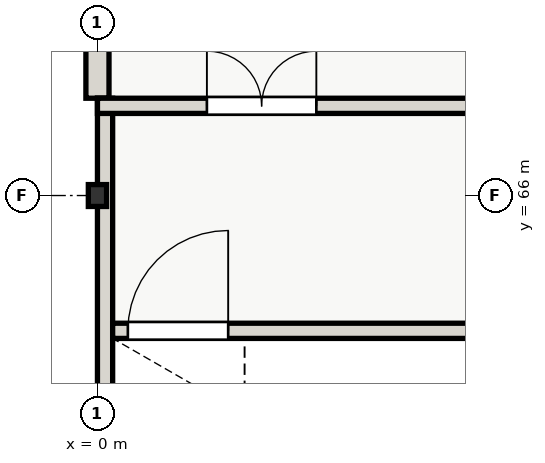
"""IFC4 building model, lengths in metres.
Left out: names, types, materials, properties, quantities, classifications, styles, units other than length and angle.
Written with IfcOpenShell. Run it as: python <this file> out.ifc"""

import sys

from ifc_helpers import new_model, si_unit, direction, frame, frame_2d, origin, origin_2d, place, context, subcontext, project, spatial, rectangle, i_section, extrude, element, fill, save


model = new_model("IFC4")
c1 = context("Model", 3, precision=1e-05, world=origin(), true_north=direction((0.0, 1.0)))
c2 = subcontext(c1, "Body", "Model", "MODEL_VIEW")
j1 = project(units=[si_unit("LENGTHUNIT", "METRE"), si_unit("PLANEANGLEUNIT", "RADIAN")], contexts=[c1])
p1 = place(None, origin())
s1 = spatial("IfcSite", under=j1, at=p1, CompositionType="ELEMENT")
p2 = place(p1, origin())
s2 = spatial("IfcBuilding", under=s1, at=p2, CompositionType="ELEMENT")
p3 = place(p2, frame((0.0, 0.0, 8.4)))
s3 = spatial("IfcBuildingStorey", under=s2, at=p3, CompositionType="ELEMENT", Elevation=8.4)
p4 = place(p3, frame((0.0, 66.0, 0.0), z_axis=(0.0, 0.0, 1.0), x_axis=(1.0, 0.0, 0.0)))
e1 = element("IfcColumn", 1, at=p4, inside=s3, PredefinedType="COLUMN", context=c2, shape_type="SweptSolid", body=[
    extrude(i_section(OverallWidth=0.3, OverallDepth=0.36, WebThickness=0.012, FlangeThickness=0.022, at=origin_2d()), origin(), (0.0, 0.0, 1.0), 4.2),
])
p5 = place(p3, frame((0.0, 67.6, 0.0), z_axis=(0.0, 0.0, 1.0), x_axis=(0.0, 1.0, 0.0)))
e2 = element("IfcWall", 2, at=p5, inside=s3, PredefinedType="SOLIDWALL", context=c2, shape_type="SweptSolid", body=[
    extrude(rectangle(XDim=4.4, YDim=0.38, at=frame_2d((2.2, 0.0))), origin(), (0.0, 0.0, 1.0), 4.2),
])
p6 = place(p5, frame((1.4, 0.0, 0.9)))
e3 = element("IfcOpeningElement", 3, at=p6, cuts=e2, PredefinedType="OPENING", context=c2, shape_type="SweptSolid", body=[
    extrude(rectangle(XDim=1.6, YDim=2.0, at=frame_2d((0.8, 1.0))), frame((0.0, 0.2, 0.0), z_axis=(0.0, -1.0, 0.0), x_axis=(1.0, 0.0, 0.0)), (0.0, 0.0, 1.0), 0.4),
])
p7 = place(p3, frame((0.125, 58.4, 0.0), z_axis=(0.0, 0.0, 1.0), x_axis=(0.0, 1.0, 0.0)))
e4 = element("IfcWall", 4, at=p7, inside=s3, PredefinedType="SHEAR", context=c2, shape_type="SweptSolid", body=[
    extrude(rectangle(XDim=9.2, YDim=0.25, at=frame_2d((4.6, 0.0))), origin(), (0.0, 0.0, 1.0), 4.2),
])
p8 = place(p3, frame((0.0, 67.475, 0.0), z_axis=(0.0, 0.0, 1.0), x_axis=(1.0, 0.0, 0.0)))
e5 = element("IfcWall", 5, at=p8, inside=s3, PredefinedType="SHEAR", context=c2, shape_type="SweptSolid", body=[
    extrude(rectangle(XDim=9.2, YDim=0.25, at=frame_2d((4.6, 0.0))), origin(), (0.0, 0.0, 1.0), 4.2),
])
p9 = place(p8, frame((1.8, 0.0, 0.0)))
e6 = element("IfcOpeningElement", 6, at=p9, cuts=e5, PredefinedType="OPENING", context=c2, shape_type="SweptSolid", body=[
    extrude(rectangle(XDim=1.8, YDim=2.15, at=frame_2d((0.9, 1.075))), frame((0.0, 0.135, 0.0), z_axis=(0.0, -1.0, 0.0), x_axis=(1.0, 0.0, 0.0)), (0.0, 0.0, 1.0), 0.27),
])
p10 = place(p3, frame((0.25, 63.775, 0.0), z_axis=(0.0, 0.0, 1.0), x_axis=(1.0, 0.0, 0.0)))
e7 = element("IfcWall", 7, at=p10, inside=s3, PredefinedType="SHEAR", context=c2, shape_type="SweptSolid", body=[
    extrude(rectangle(XDim=8.7, YDim=0.25, at=frame_2d((4.35, 0.0))), origin(), (0.0, 0.0, 1.0), 4.2),
])
p11 = place(p10, frame((0.25, 0.0, 0.0)))
e8 = element("IfcOpeningElement", 8, at=p11, cuts=e7, PredefinedType="OPENING", context=c2, shape_type="SweptSolid", body=[
    extrude(rectangle(XDim=1.65, YDim=2.1, at=frame_2d((0.825, 1.05))), frame((0.0, 0.135, 0.0), z_axis=(0.0, -1.0, 0.0), x_axis=(1.0, 0.0, 0.0)), (0.0, 0.0, 1.0), 0.27),
])
p12 = place(p9, origin())
e9 = element("IfcDoor", 9, at=p12, inside=s3, OperationType="DOUBLE_DOOR_SINGLE_SWING", PredefinedType="DOOR", context=c2, shape_type="SweptSolid", body=[
    extrude(rectangle(XDim=1.8, YDim=2.15, at=frame_2d((0.9, 1.075))), frame((0.0, 0.025, 0.0), z_axis=(0.0, -1.0, 0.0), x_axis=(1.0, 0.0, 0.0)), (0.0, 0.0, 1.0), 0.05),
])
fill(e6, e9)
p13 = place(p11, origin())
e10 = element("IfcDoor", 10, at=p13, inside=s3, OperationType="SINGLE_SWING_RIGHT", PredefinedType="DOOR", context=c2, shape_type="SweptSolid", body=[
    extrude(rectangle(XDim=1.65, YDim=2.1, at=frame_2d((0.825, 1.05))), frame((0.0, 0.025, 0.0), z_axis=(0.0, -1.0, 0.0), x_axis=(1.0, 0.0, 0.0)), (0.0, 0.0, 1.0), 0.05),
])
fill(e8, e10)
save(model, sys.argv[1])
